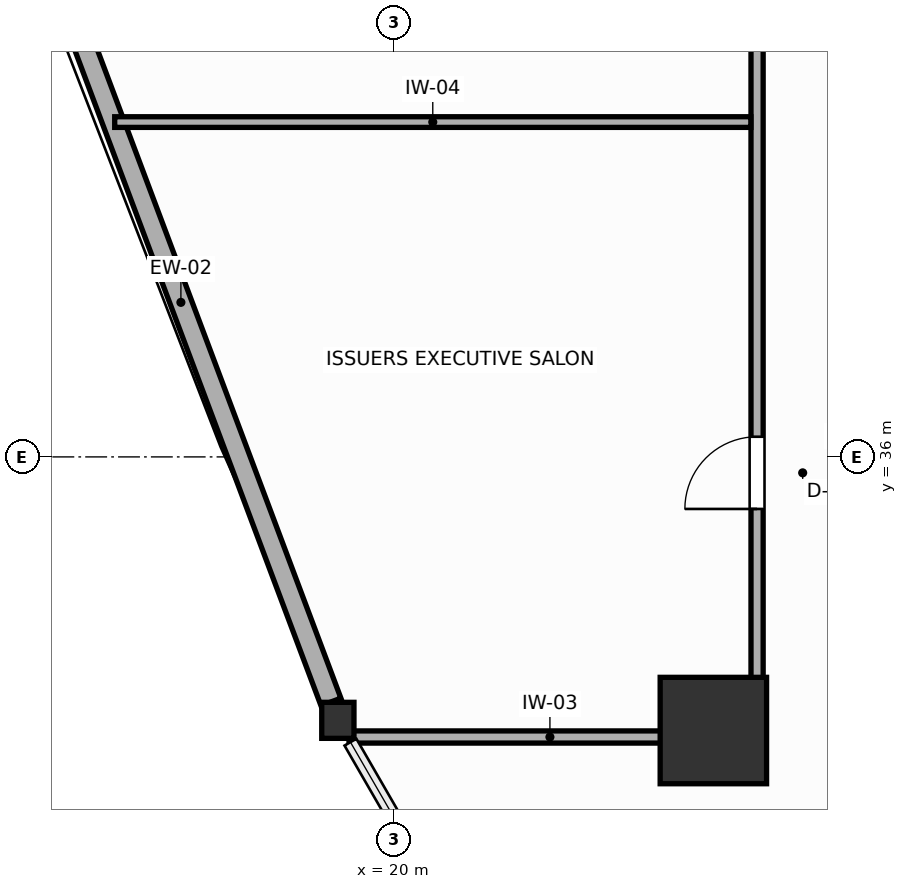
"""IFC4 building model, lengths in metres.
Left out: names, types, materials, properties, quantities, classifications, styles, units other than length and angle.
Written with IfcOpenShell. Run it as: python <this file> out.ifc"""

import sys

from ifc_helpers import new_model, si_unit, direction, frame, frame_2d, origin, origin_2d, place, context, subcontext, project, spatial, rectangle, i_section, extrude, source, transform, mapped, element, fill, save


model = new_model("IFC4")
c1 = context("Model", 3, precision=1e-05, world=origin(), true_north=direction((0.0, 1.0)))
c2 = subcontext(c1, "Body", "Model", "MODEL_VIEW")
j1 = project(units=[si_unit("LENGTHUNIT", "METRE"), si_unit("PLANEANGLEUNIT", "RADIAN")], contexts=[c1])
p1 = place(None, origin())
s1 = spatial("IfcSite", under=j1, at=p1, CompositionType="ELEMENT")
p2 = place(p1, origin())
s2 = spatial("IfcBuilding", under=s1, at=p2, CompositionType="ELEMENT")
p3 = place(p2, frame((0.0, 0.0, 83.4)))
s3 = spatial("IfcBuildingStorey", under=s2, at=p3, CompositionType="ELEMENT", Elevation=83.4)
m1 = source(origin(), c2, "Body", "SweptSolid", [
    extrude(rectangle(XDim=1.4, YDim=1.4, at=origin_2d()), origin(), (0.0, 0.0, 1.0), 3.9),
])
p4 = place(p3, frame((24.2, 32.4, 0.0), z_axis=(0.0, 0.0, 1.0), x_axis=(1.0, 0.0, 0.0)))
e1 = element("IfcColumn", 1, at=p4, inside=s3, PredefinedType="COLUMN", context=c2, shape_type="MappedRepresentation", body=[
    mapped(m1, transform((0.0, 0.0, 0.0), scale=1.0)),
])
m2 = source(origin(), c2, "Body", "SweptSolid", [
    extrude(i_section(OverallWidth=0.424, OverallDepth=0.474, WebThickness=0.045, FlangeThickness=0.072, FilletRadius=0.015, at=origin_2d()), origin(), (0.0, 0.0, 1.0), 3.9),
])
p5 = place(p3, frame((19.26, 32.534, 0.0), z_axis=(0.0, 0.0, 1.0), x_axis=(1.0, 0.0, 0.0)))
e2 = element("IfcColumn", 2, at=p5, inside=s3, PredefinedType="COLUMN", context=c2, shape_type="MappedRepresentation", body=[
    mapped(m2, transform((0.0, 0.0, 0.0), scale=1.0)),
])
p6 = place(p3, frame((13.129, 48.86, 0.0), z_axis=(0.0, 0.0, 1.0), x_axis=(0.351559441404, -0.936165561832, 0.0)))
e3 = element("IfcWall", 3, at=p6, inside=s3, PredefinedType="SOLIDWALL", context=c2, shape_type="SweptSolid", body=[
    extrude(rectangle(XDim=17.181, YDim=0.28, at=frame_2d((8.59, 0.0))), origin(), (0.0, 0.0, 1.0), 2.08),
])
p7 = place(p6, frame((4.07, 0.0, 0.75)))
e4 = element("IfcOpeningElement", 4, at=p7, cuts=e3, PredefinedType="OPENING", context=c2, shape_type="SweptSolid", body=[
    extrude(rectangle(XDim=1.7, YDim=1.15, at=frame_2d((0.85, 0.575))), frame((0.0, 0.15, 0.0), z_axis=(0.0, -1.0, 0.0), x_axis=(1.0, 0.0, 0.0)), (0.0, 0.0, 1.0), 0.3),
])
p8 = place(p3, frame((24.775, 32.31, 0.0), z_axis=(0.0, 0.0, 1.0), x_axis=(0.0, 1.0, 0.0)))
e5 = element("IfcWall", 5, at=p8, inside=s3, PredefinedType="PARTITIONING", context=c2, shape_type="SweptSolid", body=[
    extrude(rectangle(XDim=22.218, YDim=0.16, at=frame_2d((11.109, 0.0))), origin(), (0.0, 0.0, 1.0), 3.68),
])
p9 = place(p8, frame((3.005, 0.0, 0.0)))
e6 = element("IfcOpeningElement", 6, at=p9, cuts=e5, PredefinedType="OPENING", context=c2, shape_type="SweptSolid", body=[
    extrude(rectangle(XDim=0.95, YDim=2.05, at=frame_2d((0.475, 1.025))), frame((0.0, 0.09, 0.0), z_axis=(0.0, -1.0, 0.0), x_axis=(1.0, 0.0, 0.0)), (0.0, 0.0, 1.0), 0.18),
])
p10 = place(p8, frame((11.516, 0.0, 0.0)))
e7 = element("IfcOpeningElement", 7, at=p10, cuts=e5, PredefinedType="OPENING", context=c2, shape_type="SweptSolid", body=[
    extrude(rectangle(XDim=0.95, YDim=2.05, at=frame_2d((0.475, 1.025))), frame((0.0, 0.09, 0.0), z_axis=(0.0, -1.0, 0.0), x_axis=(1.0, 0.0, 0.0)), (0.0, 0.0, 1.0), 0.18),
])
p11 = place(p3, frame((19.406, 32.315, 0.0), z_axis=(0.0, 0.0, 1.0), x_axis=(1.0, 0.0, 0.0)))
e8 = element("IfcWall", 8, at=p11, inside=s3, PredefinedType="PARTITIONING", context=c2, shape_type="SweptSolid", body=[
    extrude(rectangle(XDim=5.287, YDim=0.16, at=frame_2d((2.644, 0.0))), origin(), (0.0, 0.0, 1.0), 2.24),
])
p12 = place(p3, frame((16.324, 40.405, 0.0), z_axis=(0.0, 0.0, 1.0), x_axis=(1.0, 0.0, 0.0)))
e9 = element("IfcWall", 9, at=p12, inside=s3, PredefinedType="PARTITIONING", context=c2, shape_type="SweptSolid", body=[
    extrude(rectangle(XDim=8.369, YDim=0.14, at=frame_2d((4.185, 0.0))), origin(), (0.0, 0.0, 1.0), 3.68),
])
p13 = place(p9, origin())
e10 = element("IfcDoor", 10, at=p13, inside=s3, OperationType="SINGLE_SWING_LEFT", PredefinedType="DOOR", context=c2, shape_type="SweptSolid", body=[
    extrude(rectangle(XDim=0.95, YDim=2.05, at=frame_2d((0.475, 1.025))), frame((0.0, 0.025, 0.0), z_axis=(0.0, -1.0, 0.0), x_axis=(1.0, 0.0, 0.0)), (0.0, 0.0, 1.0), 0.05),
])
fill(e6, e10)
save(model, sys.argv[1])
